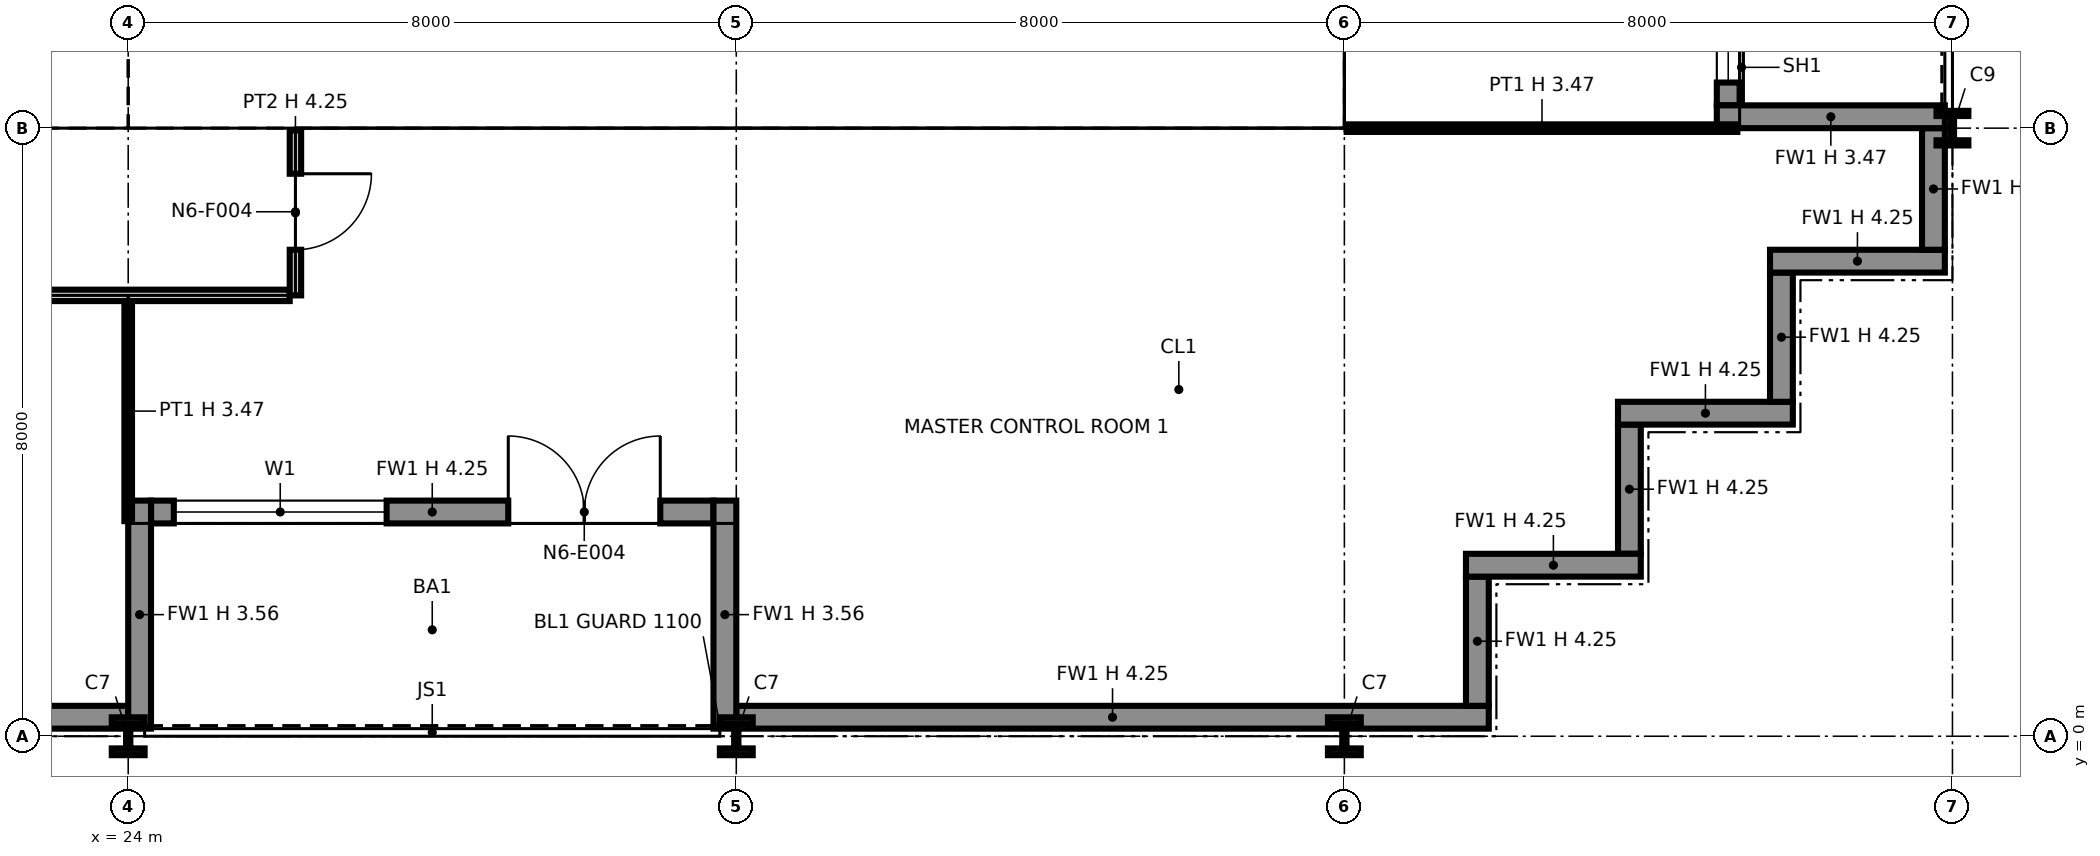
"""IFC4 building model, lengths in metres.
Left out: names, types, materials, properties, quantities, classifications, styles, units other than length and angle.
Written with IfcOpenShell. Run it as: python <this file> out.ifc"""

import sys

from ifc_helpers import new_model, si_unit, direction, frame, frame_2d, origin, origin_2d, place, context, subcontext, project, spatial, polyline, rectangle, i_section, outline, extrude, element, fill, save


model = new_model("IFC4")
c1 = context("Model", 3, precision=1e-05, world=origin(), true_north=direction((0.0, 1.0)))
c2 = subcontext(c1, "Body", "Model", "MODEL_VIEW")
j1 = project(units=[si_unit("LENGTHUNIT", "METRE"), si_unit("PLANEANGLEUNIT", "RADIAN")], contexts=[c1])
p1 = place(None, origin())
s1 = spatial("IfcSite", under=j1, at=p1, CompositionType="ELEMENT")
p2 = place(p1, origin())
s2 = spatial("IfcBuilding", under=s1, at=p2, CompositionType="ELEMENT")
p3 = place(p2, frame((0.0, 0.0, 96.4)))
s3 = spatial("IfcBuildingStorey", under=s2, at=p3, CompositionType="ELEMENT", Elevation=96.4)
p4 = place(p3, frame((24.0, 0.0, 0.0), z_axis=(0.0, 0.0, 1.0), x_axis=(1.0, 0.0, 0.0)))
e1 = element("IfcColumn", 1, at=p4, inside=s3, PredefinedType="COLUMN", context=c2, shape_type="SweptSolid", body=[
    extrude(i_section(OverallWidth=0.432, OverallDepth=0.498, WebThickness=0.056, FlangeThickness=0.089, at=origin_2d()), origin(), (0.0, 0.0, 1.0), 4.25),
])
p5 = place(p3, frame((24.0, 8.0, 0.0), z_axis=(0.0, 0.0, 1.0), x_axis=(1.0, 0.0, 0.0)))
e2 = element("IfcColumn", 2, at=p5, inside=s3, PredefinedType="COLUMN", context=c2, shape_type="SweptSolid", body=[
    extrude(i_section(OverallWidth=0.411, OverallDepth=0.434, WebThickness=0.036, FlangeThickness=0.057, at=origin_2d()), origin(), (0.0, 0.0, 1.0), 4.25),
])
p6 = place(p3, frame((32.0, 0.0, 0.0), z_axis=(0.0, 0.0, 1.0), x_axis=(1.0, 0.0, 0.0)))
e3 = element("IfcColumn", 3, at=p6, inside=s3, PredefinedType="COLUMN", context=c2, shape_type="SweptSolid", body=[
    extrude(i_section(OverallWidth=0.432, OverallDepth=0.498, WebThickness=0.056, FlangeThickness=0.089, at=origin_2d()), origin(), (0.0, 0.0, 1.0), 4.25),
])
p7 = place(p3, frame((32.0, 8.0, 0.0), z_axis=(0.0, 0.0, 1.0), x_axis=(1.0, 0.0, 0.0)))
e4 = element("IfcColumn", 4, at=p7, inside=s3, PredefinedType="COLUMN", context=c2, shape_type="SweptSolid", body=[
    extrude(i_section(OverallWidth=0.406, OverallDepth=0.417, WebThickness=0.03, FlangeThickness=0.048, at=origin_2d()), origin(), (0.0, 0.0, 1.0), 4.25),
])
p8 = place(p3, frame((40.0, 0.0, 0.0), z_axis=(0.0, 0.0, 1.0), x_axis=(1.0, 0.0, 0.0)))
e5 = element("IfcColumn", 5, at=p8, inside=s3, PredefinedType="COLUMN", context=c2, shape_type="SweptSolid", body=[
    extrude(i_section(OverallWidth=0.432, OverallDepth=0.498, WebThickness=0.056, FlangeThickness=0.089, at=origin_2d()), origin(), (0.0, 0.0, 1.0), 4.25),
])
p9 = place(p3, frame((40.0, 8.0, 0.0), z_axis=(0.0, 0.0, 1.0), x_axis=(1.0, 0.0, 0.0)))
e6 = element("IfcColumn", 6, at=p9, inside=s3, PredefinedType="COLUMN", context=c2, shape_type="SweptSolid", body=[
    extrude(i_section(OverallWidth=0.406, OverallDepth=0.417, WebThickness=0.03, FlangeThickness=0.048, at=origin_2d()), origin(), (0.0, 0.0, 1.0), 4.25),
])
p10 = place(p3, frame((48.0, 8.0, 0.0), z_axis=(0.0, 0.0, 1.0), x_axis=(1.0, 0.0, 0.0)))
e7 = element("IfcColumn", 7, at=p10, inside=s3, PredefinedType="COLUMN", context=c2, shape_type="SweptSolid", body=[
    extrude(i_section(OverallWidth=0.419, OverallDepth=0.455, WebThickness=0.042, FlangeThickness=0.068, at=origin_2d()), origin(), (0.0, 0.0, 1.0), 4.25),
])
p11 = place(p3, frame((16.0, 0.25, 0.0), z_axis=(0.0, 0.0, 1.0), x_axis=(1.0, 0.0, 0.0)))
e8 = element("IfcWall", 8, at=p11, inside=s3, PredefinedType="SOLIDWALL", context=c2, shape_type="SweptSolid", body=[
    extrude(rectangle(XDim=8.0, YDim=0.3, at=frame_2d((4.0, 0.0))), origin(), (0.0, 0.0, 1.0), 4.25),
])
p12 = place(p3, frame((24.3, 2.95, 0.0), z_axis=(0.0, 0.0, 1.0), x_axis=(1.0, 0.0, 0.0)))
e9 = element("IfcWall", 9, at=p12, inside=s3, PredefinedType="SOLIDWALL", context=c2, shape_type="SweptSolid", body=[
    extrude(rectangle(XDim=7.4, YDim=0.3, at=frame_2d((3.7, 0.0))), origin(), (0.0, 0.0, 1.0), 4.25),
])
p13 = place(p12, frame((0.3, 0.0, 0.9)))
e10 = element("IfcOpeningElement", 10, at=p13, cuts=e9, PredefinedType="OPENING", context=c2, shape_type="SweptSolid", body=[
    extrude(rectangle(XDim=2.8, YDim=2.2, at=frame_2d((1.4, 1.1))), frame((0.0, 0.16, 0.0), z_axis=(0.0, -1.0, 0.0), x_axis=(1.0, 0.0, 0.0)), (0.0, 0.0, 1.0), 0.32),
])
p14 = place(p12, frame((4.7, 0.0, 0.0)))
e11 = element("IfcOpeningElement", 11, at=p14, cuts=e9, PredefinedType="OPENING", context=c2, shape_type="SweptSolid", body=[
    extrude(rectangle(XDim=2.0, YDim=2.4, at=frame_2d((1.0, 1.2))), frame((0.0, 0.16, 0.0), z_axis=(0.0, -1.0, 0.0), x_axis=(1.0, 0.0, 0.0)), (0.0, 0.0, 1.0), 0.32),
])
for number, where, z_axis, x_axis in (
    (12, (24.15, 0.1, 0.0), (0.0, 0.0, 1.0), (0.0, 1.0, 0.0)),
    (13, (31.85, 0.1, 0.0), (0.0, 0.0, 1.0), (0.0, 1.0, 0.0)),
):
    element("IfcWall", number, at=place(p3, frame(where, z_axis=z_axis, x_axis=x_axis)), inside=s3, PredefinedType="SOLIDWALL", context=c2, shape_type="SweptSolid", body=[
        extrude(rectangle(XDim=3.0, YDim=0.3, at=frame_2d((1.5, 0.0))), origin(), (0.0, 0.0, 1.0), 3.556),
    ])
p15 = place(p3, frame((32.0, 0.25, 0.0), z_axis=(0.0, 0.0, 1.0), x_axis=(1.0, 0.0, 0.0)))
e14 = element("IfcWall", 14, at=p15, inside=s3, PredefinedType="SOLIDWALL", context=c2, shape_type="SweptSolid", body=[
    extrude(rectangle(XDim=9.9, YDim=0.3, at=frame_2d((4.95, 0.0))), origin(), (0.0, 0.0, 1.0), 4.25),
])
p16 = place(p3, frame((41.75, 0.4, 0.0), z_axis=(0.0, 0.0, 1.0), x_axis=(0.0, 1.0, 0.0)))
e15 = element("IfcWall", 15, at=p16, inside=s3, PredefinedType="SOLIDWALL", context=c2, shape_type="SweptSolid", body=[
    extrude(rectangle(XDim=1.7, YDim=0.3, at=frame_2d((0.85, 0.0))), origin(), (0.0, 0.0, 1.0), 4.25),
])
p17 = place(p3, frame((41.6, 2.25, 0.0), z_axis=(0.0, 0.0, 1.0), x_axis=(1.0, 0.0, 0.0)))
e16 = element("IfcWall", 16, at=p17, inside=s3, PredefinedType="SOLIDWALL", context=c2, shape_type="SweptSolid", body=[
    extrude(rectangle(XDim=2.3, YDim=0.3, at=frame_2d((1.15, 0.0))), origin(), (0.0, 0.0, 1.0), 4.25),
])
p18 = place(p3, frame((43.75, 2.4, 0.0), z_axis=(0.0, 0.0, 1.0), x_axis=(0.0, 1.0, 0.0)))
e17 = element("IfcWall", 17, at=p18, inside=s3, PredefinedType="SOLIDWALL", context=c2, shape_type="SweptSolid", body=[
    extrude(rectangle(XDim=1.7, YDim=0.3, at=frame_2d((0.85, 0.0))), origin(), (0.0, 0.0, 1.0), 4.25),
])
p19 = place(p3, frame((43.6, 4.25, 0.0), z_axis=(0.0, 0.0, 1.0), x_axis=(1.0, 0.0, 0.0)))
e18 = element("IfcWall", 18, at=p19, inside=s3, PredefinedType="SOLIDWALL", context=c2, shape_type="SweptSolid", body=[
    extrude(rectangle(XDim=2.3, YDim=0.3, at=frame_2d((1.15, 0.0))), origin(), (0.0, 0.0, 1.0), 4.25),
])
p20 = place(p3, frame((45.75, 4.4, 0.0), z_axis=(0.0, 0.0, 1.0), x_axis=(0.0, 1.0, 0.0)))
e19 = element("IfcWall", 19, at=p20, inside=s3, PredefinedType="SOLIDWALL", context=c2, shape_type="SweptSolid", body=[
    extrude(rectangle(XDim=1.7, YDim=0.3, at=frame_2d((0.85, 0.0))), origin(), (0.0, 0.0, 1.0), 4.25),
])
p21 = place(p3, frame((45.6, 6.25, 0.0), z_axis=(0.0, 0.0, 1.0), x_axis=(1.0, 0.0, 0.0)))
e20 = element("IfcWall", 20, at=p21, inside=s3, PredefinedType="SOLIDWALL", context=c2, shape_type="SweptSolid", body=[
    extrude(rectangle(XDim=2.3, YDim=0.3, at=frame_2d((1.15, 0.0))), origin(), (0.0, 0.0, 1.0), 4.25),
])
p22 = place(p3, frame((47.75, 6.4, 0.0), z_axis=(0.0, 0.0, 1.0), x_axis=(0.0, 1.0, 0.0)))
e21 = element("IfcWall", 21, at=p22, inside=s3, PredefinedType="SOLIDWALL", context=c2, shape_type="SweptSolid", body=[
    extrude(rectangle(XDim=1.6, YDim=0.3, at=frame_2d((0.8, 0.0))), origin(), (0.0, 0.0, 1.0), 4.25),
])
p23 = place(p3, frame((45.05, 8.3, 0.0), z_axis=(0.0, 0.0, 1.0), x_axis=(0.0, 1.0, 0.0)))
e22 = element("IfcWall", 22, at=p23, inside=s3, PredefinedType="SOLIDWALL", context=c2, shape_type="SweptSolid", body=[
    extrude(rectangle(XDim=7.4, YDim=0.3, at=frame_2d((3.7, 0.0))), origin(), (0.0, 0.0, 1.0), 4.25),
])
p24 = place(p23, frame((0.3, 0.0, 0.9)))
e23 = element("IfcOpeningElement", 23, at=p24, cuts=e22, PredefinedType="OPENING", context=c2, shape_type="SweptSolid", body=[
    extrude(rectangle(XDim=2.8, YDim=2.2, at=frame_2d((1.4, 1.1))), frame((0.0, 0.16, 0.0), z_axis=(0.0, -1.0, 0.0), x_axis=(1.0, 0.0, 0.0)), (0.0, 0.0, 1.0), 0.32),
])
p25 = place(p23, frame((4.7, 0.0, 0.0)))
e24 = element("IfcOpeningElement", 24, at=p25, cuts=e22, PredefinedType="OPENING", context=c2, shape_type="SweptSolid", body=[
    extrude(rectangle(XDim=2.0, YDim=2.4, at=frame_2d((1.0, 1.2))), frame((0.0, 0.16, 0.0), z_axis=(0.0, -1.0, 0.0), x_axis=(1.0, 0.0, 0.0)), (0.0, 0.0, 1.0), 0.32),
])
p26 = place(p3, frame((47.9, 8.15, 0.0), z_axis=(0.0, 0.0, 1.0), x_axis=(-1.0, 0.0, 0.0)))
e25 = element("IfcWall", 25, at=p26, inside=s3, PredefinedType="SOLIDWALL", context=c2, shape_type="SweptSolid", body=[
    extrude(rectangle(XDim=3.0, YDim=0.3, at=frame_2d((1.5, 0.0))), origin(), (0.0, 0.0, 1.0), 3.469),
])
p27 = place(p3, frame((8.65, 8.75, 0.0), z_axis=(0.0, 0.0, 1.0), x_axis=(1.0, 0.0, 0.0)))
e26 = element("IfcWall", 26, at=p27, inside=s3, PredefinedType="PARTITIONING", context=c2, shape_type="SweptSolid", body=[
    extrude(outline(polyline([(0.0, 0.0), (14.7, 0.0), (14.7, 4.25), (7.469, 4.25), (7.469, 3.632), (7.231, 3.632), (7.23, 4.25), (0.0, 4.25), (0.0, 0.0)])), frame((0.0, 0.1, 0.0), z_axis=(0.0, -1.0, 0.0), x_axis=(1.0, 0.0, 0.0)), (0.0, 0.0, 1.0), 0.2),
])
p28 = place(p27, frame((1.3, 0.0, 0.0)))
e27 = element("IfcOpeningElement", 27, at=p28, cuts=e26, PredefinedType="OPENING", context=c2, shape_type="SweptSolid", body=[
    extrude(rectangle(XDim=1.4, YDim=2.1, at=frame_2d((0.7, 1.05))), frame((0.0, 0.11, 0.0), z_axis=(0.0, -1.0, 0.0), x_axis=(1.0, 0.0, 0.0)), (0.0, 0.0, 1.0), 0.22),
])
p29 = place(p27, frame((4.6, 0.0, 0.0)))
e28 = element("IfcOpeningElement", 28, at=p29, cuts=e26, PredefinedType="OPENING", context=c2, shape_type="SweptSolid", body=[
    extrude(rectangle(XDim=1.4, YDim=2.1, at=frame_2d((0.7, 1.05))), frame((0.0, 0.11, 0.0), z_axis=(0.0, -1.0, 0.0), x_axis=(1.0, 0.0, 0.0)), (0.0, 0.0, 1.0), 0.22),
])
p30 = place(p27, frame((10.4, 0.0, 0.0)))
e29 = element("IfcOpeningElement", 29, at=p30, cuts=e26, PredefinedType="OPENING", context=c2, shape_type="SweptSolid", body=[
    extrude(rectangle(XDim=1.2, YDim=2.1, at=frame_2d((0.6, 1.05))), frame((0.0, 0.11, 0.0), z_axis=(0.0, -1.0, 0.0), x_axis=(1.0, 0.0, 0.0)), (0.0, 0.0, 1.0), 0.22),
])
p31 = place(p3, frame((23.25, 8.85, 0.0), z_axis=(0.0, 0.0, 1.0), x_axis=(0.0, 1.0, 0.0)))
e30 = element("IfcWall", 30, at=p31, inside=s3, PredefinedType="PARTITIONING", context=c2, shape_type="SweptSolid", body=[
    extrude(outline(polyline([(0.0, 0.0), (14.3, 0.0), (14.3, 4.25), (11.231, 4.25), (11.23, 3.789), (11.07, 3.789), (11.069, 4.25), (7.27, 4.25), (7.269, 3.632), (7.031, 3.632), (7.031, 4.25), (1.231, 4.25), (1.23, 3.789), (1.07, 3.789), (1.069, 4.25), (0.0, 4.25), (0.0, 0.0)])), frame((0.0, 0.1, 0.0), z_axis=(0.0, -1.0, 0.0), x_axis=(1.0, 0.0, 0.0)), (0.0, 0.0, 1.0), 0.2),
])
p32 = place(p31, frame((8.3, 0.0, 0.0)))
e31 = element("IfcOpeningElement", 31, at=p32, cuts=e30, PredefinedType="OPENING", context=c2, shape_type="SweptSolid", body=[
    extrude(rectangle(XDim=1.8, YDim=2.1, at=frame_2d((0.9, 1.05))), frame((0.0, 0.11, 0.0), z_axis=(0.0, -1.0, 0.0), x_axis=(1.0, 0.0, 0.0)), (0.0, 0.0, 1.0), 0.22),
])
p33 = place(p3, frame((24.65, 8.75, 0.0), z_axis=(0.0, 0.0, 1.0), x_axis=(1.0, 0.0, 0.0)))
e32 = element("IfcWall", 32, at=p33, inside=s3, PredefinedType="PARTITIONING", context=c2, shape_type="SweptSolid", body=[
    extrude(outline(polyline([(0.0, 0.0), (14.7, 0.0), (14.7, 4.25), (7.469, 4.25), (7.469, 3.632), (7.231, 3.632), (7.23, 4.25), (0.0, 4.25), (0.0, 0.0)])), frame((0.0, 0.1, 0.0), z_axis=(0.0, -1.0, 0.0), x_axis=(1.0, 0.0, 0.0)), (0.0, 0.0, 1.0), 0.2),
])
p34 = place(p3, frame((24.75, 8.85, 0.0), z_axis=(0.0, 0.0, 1.0), x_axis=(0.0, 1.0, 0.0)))
e33 = element("IfcWall", 33, at=p34, inside=s3, PredefinedType="PARTITIONING", context=c2, shape_type="SweptSolid", body=[
    extrude(outline(polyline([(0.0, 0.0), (6.3, 0.0), (6.3, 4.25), (3.231, 4.25), (3.23, 3.789), (3.07, 3.789), (3.069, 4.25), (0.0, 4.25), (0.0, 0.0)])), frame((0.0, 0.1, 0.0), z_axis=(0.0, -1.0, 0.0), x_axis=(1.0, 0.0, 0.0)), (0.0, 0.0, 1.0), 0.2),
])
for number, where, z_axis, x_axis in (
    (34, (27.875, 8.85, 0.0), (0.0, 0.0, 1.0), (0.0, 1.0, 0.0)),
    (35, (29.925, 8.85, 0.0), (0.0, 0.0, 1.0), (0.0, 1.0, 0.0)),
):
    element("IfcWall", number, at=place(p3, frame(where, z_axis=z_axis, x_axis=x_axis)), inside=s3, PredefinedType="PARTITIONING", context=c2, shape_type="SweptSolid", body=[
        extrude(outline(polyline([(0.0, 0.0), (4.2, 0.0), (4.2, 4.25), (3.231, 4.25), (3.23, 3.789), (3.07, 3.789), (3.069, 4.25), (0.0, 4.25), (0.0, 0.0)])), frame((0.0, 0.075, 0.0), z_axis=(0.0, -1.0, 0.0), x_axis=(1.0, 0.0, 0.0)), (0.0, 0.0, 1.0), 0.15),
    ])
p35 = place(p3, frame((32.0, 8.85, 0.0), z_axis=(0.0, 0.0, 1.0), x_axis=(0.0, 1.0, 0.0)))
e36 = element("IfcWall", 36, at=p35, inside=s3, PredefinedType="PARTITIONING", context=c2, shape_type="SweptSolid", body=[
    extrude(rectangle(XDim=4.2, YDim=0.6, at=frame_2d((2.1, 0.0))), origin(), (0.0, 0.0, 1.0), 3.632),
])
for number, where, z_axis, x_axis in (
    (37, (35.6, 8.85, 0.0), (0.0, 0.0, 1.0), (0.0, 1.0, 0.0)),
    (38, (39.25, 8.85, 0.0), (0.0, 0.0, 1.0), (0.0, 1.0, 0.0)),
):
    element("IfcWall", number, at=place(p3, frame(where, z_axis=z_axis, x_axis=x_axis)), inside=s3, PredefinedType="PARTITIONING", context=c2, shape_type="SweptSolid", body=[
        extrude(rectangle(XDim=6.3, YDim=0.2, at=frame_2d((3.15, 0.0))), origin(), (0.0, 0.0, 1.0), 4.25),
    ])
p36 = place(p3, frame((24.0, 2.83, 0.0), z_axis=(0.0, 0.0, 1.0), x_axis=(0.0, 1.0, 0.0)))
e39 = element("IfcWall", 39, at=p36, inside=s3, PredefinedType="PARTITIONING", context=c2, shape_type="SweptSolid", body=[
    extrude(rectangle(XDim=2.895, YDim=0.1, at=frame_2d((1.448, 0.0))), origin(), (0.0, 0.0, 1.0), 3.47),
])
p37 = place(p3, frame((5.875, 5.8, 0.0), z_axis=(0.0, 0.0, 1.0), x_axis=(1.0, 0.0, 0.0)))
e40 = element("IfcWall", 40, at=p37, inside=s3, PredefinedType="PARTITIONING", context=c2, shape_type="SweptSolid", body=[
    extrude(rectangle(XDim=20.25, YDim=0.15, at=frame_2d((10.125, 0.0))), origin(), (0.0, 0.0, 1.0), 4.25),
])
p38 = place(p37, frame((14.625, 0.0, 0.0), z_axis=(0.0, 0.0, 1.0), x_axis=(-1.0, 0.0, 0.0)))
e41 = element("IfcOpeningElement", 41, at=p38, cuts=e40, PredefinedType="OPENING", context=c2, shape_type="SweptSolid", body=[
    extrude(rectangle(XDim=1.0, YDim=2.1, at=frame_2d((0.5, 1.05))), frame((0.0, 0.085, 0.0), z_axis=(0.0, -1.0, 0.0), x_axis=(1.0, 0.0, 0.0)), (0.0, 0.0, 1.0), 0.17),
])
p39 = place(p37, frame((4.625, 0.0, 0.0), z_axis=(0.0, 0.0, 1.0), x_axis=(-1.0, 0.0, 0.0)))
e42 = element("IfcOpeningElement", 42, at=p39, cuts=e40, PredefinedType="OPENING", context=c2, shape_type="SweptSolid", body=[
    extrude(rectangle(XDim=1.0, YDim=2.1, at=frame_2d((0.5, 1.05))), frame((0.0, 0.085, 0.0), z_axis=(0.0, -1.0, 0.0), x_axis=(1.0, 0.0, 0.0)), (0.0, 0.0, 1.0), 0.17),
])
p40 = place(p37, frame((8.625, 0.0, 0.0), z_axis=(0.0, 0.0, 1.0), x_axis=(-1.0, 0.0, 0.0)))
e43 = element("IfcOpeningElement", 43, at=p40, cuts=e40, PredefinedType="OPENING", context=c2, shape_type="SweptSolid", body=[
    extrude(rectangle(XDim=1.0, YDim=2.1, at=frame_2d((0.5, 1.05))), frame((0.0, 0.085, 0.0), z_axis=(0.0, -1.0, 0.0), x_axis=(1.0, 0.0, 0.0)), (0.0, 0.0, 1.0), 0.17),
])
p41 = place(p3, frame((26.2, 5.8, 0.0), z_axis=(0.0, 0.0, 1.0), x_axis=(0.0, 1.0, 0.0)))
e44 = element("IfcWall", 44, at=p41, inside=s3, PredefinedType="PARTITIONING", context=c2, shape_type="SweptSolid", body=[
    extrude(rectangle(XDim=2.17, YDim=0.15, at=frame_2d((1.085, 0.0))), origin(), (0.0, 0.0, 1.0), 4.25),
])
p42 = place(p41, frame((1.6, 0.0, 0.0), z_axis=(0.0, 0.0, 1.0), x_axis=(-1.0, 0.0, 0.0)))
e45 = element("IfcOpeningElement", 45, at=p42, cuts=e44, PredefinedType="OPENING", context=c2, shape_type="SweptSolid", body=[
    extrude(rectangle(XDim=1.0, YDim=2.1, at=frame_2d((0.5, 1.05))), frame((0.0, 0.085, 0.0), z_axis=(0.0, -1.0, 0.0), x_axis=(1.0, 0.0, 0.0)), (0.0, 0.0, 1.0), 0.17),
])
p43 = place(p3, frame((40.03, 8.0, 0.0), z_axis=(0.0, 0.0, 1.0), x_axis=(1.0, 0.0, 0.0)))
e46 = element("IfcWall", 46, at=p43, inside=s3, PredefinedType="PARTITIONING", context=c2, shape_type="SweptSolid", body=[
    extrude(rectangle(XDim=5.14, YDim=0.1, at=frame_2d((2.57, 0.0))), origin(), (0.0, 0.0, 1.0), 3.47),
])
p44 = place(p13, origin())
e47 = element("IfcWindow", 47, at=p44, inside=s3, PartitioningType="SINGLE_PANEL", PredefinedType="WINDOW", context=c2, shape_type="SweptSolid", body=[
    extrude(rectangle(XDim=2.8, YDim=2.2, at=frame_2d((1.4, 1.1))), frame((0.0, 0.03, 0.0), z_axis=(0.0, -1.0, 0.0), x_axis=(1.0, 0.0, 0.0)), (0.0, 0.0, 1.0), 0.06),
])
fill(e10, e47)
p45 = place(p14, origin())
e48 = element("IfcDoor", 48, at=p45, inside=s3, OperationType="DOUBLE_DOOR_SINGLE_SWING", PredefinedType="DOOR", context=c2, shape_type="SweptSolid", body=[
    extrude(rectangle(XDim=2.0, YDim=2.4, at=frame_2d((1.0, 1.2))), frame((0.0, 0.025, 0.0), z_axis=(0.0, -1.0, 0.0), x_axis=(1.0, 0.0, 0.0)), (0.0, 0.0, 1.0), 0.05),
])
fill(e11, e48)
p46 = place(p24, origin())
e49 = element("IfcWindow", 49, at=p46, inside=s3, PartitioningType="SINGLE_PANEL", PredefinedType="WINDOW", context=c2, shape_type="SweptSolid", body=[
    extrude(rectangle(XDim=2.8, YDim=2.2, at=frame_2d((1.4, 1.1))), frame((0.0, 0.03, 0.0), z_axis=(0.0, -1.0, 0.0), x_axis=(1.0, 0.0, 0.0)), (0.0, 0.0, 1.0), 0.06),
])
fill(e23, e49)
p47 = place(p42, origin())
e50 = element("IfcDoor", 50, at=p47, inside=s3, OperationType="SINGLE_SWING_LEFT", PredefinedType="DOOR", context=c2, shape_type="SweptSolid", body=[
    extrude(rectangle(XDim=1.0, YDim=2.1, at=frame_2d((0.5, 1.05))), frame((0.0, 0.025, 0.0), z_axis=(0.0, -1.0, 0.0), x_axis=(1.0, 0.0, 0.0)), (0.0, 0.0, 1.0), 0.05),
])
fill(e45, e50)
save(model, sys.argv[1])
